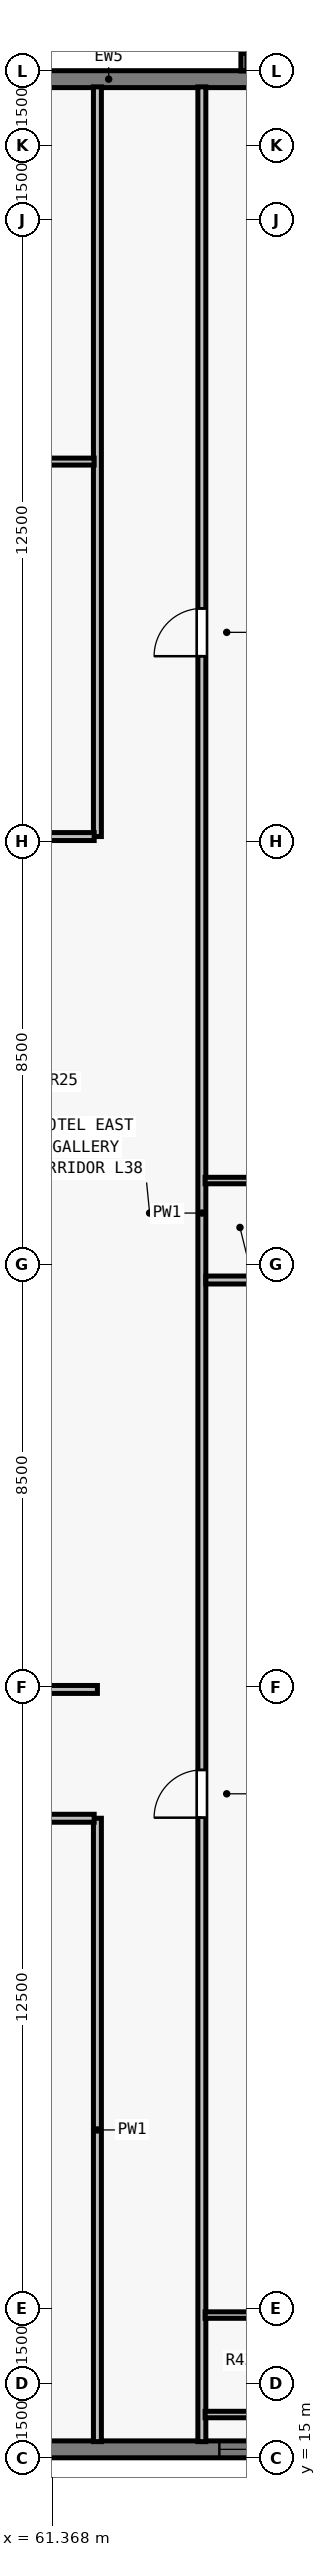
"""IFC4 building model, lengths in metres.
Left out: names, types, materials, properties, quantities, classifications, styles, units other than length and angle.
Written with IfcOpenShell. Run it as: python <this file> out.ifc"""

import sys

from ifc_helpers import new_model, si_unit, direction, frame, frame_2d, origin, place, context, subcontext, project, spatial, rectangle, extrude, element, fill, save


model = new_model("IFC4")
c1 = context("Model", 3, precision=1e-05, world=origin(), true_north=direction((0.0, 1.0)))
c2 = subcontext(c1, "Body", "Model", "MODEL_VIEW")
j1 = project(units=[si_unit("LENGTHUNIT", "METRE"), si_unit("PLANEANGLEUNIT", "RADIAN")], contexts=[c1])
p1 = place(None, origin())
s1 = spatial("IfcSite", under=j1, at=p1, CompositionType="ELEMENT")
p2 = place(p1, origin())
s2 = spatial("IfcBuilding", under=s1, at=p2, CompositionType="ELEMENT")
p3 = place(p2, frame((0.0, 0.0, 141.0)))
s3 = spatial("IfcBuildingStorey", under=s2, at=p3, CompositionType="ELEMENT", Elevation=141.0)
p4 = place(p3, frame((32.0, 62.83, 0.0), z_axis=(0.0, 0.0, 1.0), x_axis=(1.0, 0.0, 0.0)))
e1 = element("IfcWall", 1, at=p4, inside=s3, PredefinedType="SOLIDWALL", context=c2, shape_type="SweptSolid", body=[
    extrude(rectangle(XDim=39.682, YDim=0.34, at=frame_2d((19.841, 0.0))), origin(), (0.0, 0.0, 1.0), 3.28),
])
p5 = place(p4, frame((4.102, 0.0, 0.8)))
e2 = element("IfcOpeningElement", 2, at=p5, cuts=e1, PredefinedType="OPENING", context=c2, shape_type="SweptSolid", body=[
    extrude(rectangle(XDim=1.35, YDim=1.66, at=frame_2d((0.675, 0.83))), frame((0.0, 0.18, 0.0), z_axis=(0.0, -1.0, 0.0), x_axis=(1.0, 0.0, 0.0)), (0.0, 0.0, 1.0), 0.36),
])
p6 = place(p4, frame((8.755, 0.0, 0.8)))
e3 = element("IfcOpeningElement", 3, at=p6, cuts=e1, PredefinedType="OPENING", context=c2, shape_type="SweptSolid", body=[
    extrude(rectangle(XDim=1.75, YDim=1.66, at=frame_2d((0.875, 0.83))), frame((0.0, 0.18, 0.0), z_axis=(0.0, -1.0, 0.0), x_axis=(1.0, 0.0, 0.0)), (0.0, 0.0, 1.0), 0.36),
])
p7 = place(p4, frame((12.059, 0.0, 0.8)))
e4 = element("IfcOpeningElement", 4, at=p7, cuts=e1, PredefinedType="OPENING", context=c2, shape_type="SweptSolid", body=[
    extrude(rectangle(XDim=1.35, YDim=1.66, at=frame_2d((0.675, 0.83))), frame((0.0, 0.18, 0.0), z_axis=(0.0, -1.0, 0.0), x_axis=(1.0, 0.0, 0.0)), (0.0, 0.0, 1.0), 0.36),
])
p8 = place(p4, frame((16.262, 0.0, 0.8)))
e5 = element("IfcOpeningElement", 5, at=p8, cuts=e1, PredefinedType="OPENING", context=c2, shape_type="SweptSolid", body=[
    extrude(rectangle(XDim=1.75, YDim=1.66, at=frame_2d((0.875, 0.83))), frame((0.0, 0.18, 0.0), z_axis=(0.0, -1.0, 0.0), x_axis=(1.0, 0.0, 0.0)), (0.0, 0.0, 1.0), 0.36),
])
p9 = place(p4, frame((18.316, 0.0, 0.8)))
e6 = element("IfcOpeningElement", 6, at=p9, cuts=e1, PredefinedType="OPENING", context=c2, shape_type="SweptSolid", body=[
    extrude(rectangle(XDim=1.35, YDim=1.66, at=frame_2d((0.675, 0.83))), frame((0.0, 0.18, 0.0), z_axis=(0.0, -1.0, 0.0), x_axis=(1.0, 0.0, 0.0)), (0.0, 0.0, 1.0), 0.36),
])
p10 = place(p4, frame((22.07, 0.0, 0.8)))
e7 = element("IfcOpeningElement", 7, at=p10, cuts=e1, PredefinedType="OPENING", context=c2, shape_type="SweptSolid", body=[
    extrude(rectangle(XDim=1.75, YDim=1.66, at=frame_2d((0.875, 0.83))), frame((0.0, 0.18, 0.0), z_axis=(0.0, -1.0, 0.0), x_axis=(1.0, 0.0, 0.0)), (0.0, 0.0, 1.0), 0.36),
])
p11 = place(p4, frame((26.273, 0.0, 0.8)))
e8 = element("IfcOpeningElement", 8, at=p11, cuts=e1, PredefinedType="OPENING", context=c2, shape_type="SweptSolid", body=[
    extrude(rectangle(XDim=1.35, YDim=1.66, at=frame_2d((0.675, 0.83))), frame((0.0, 0.18, 0.0), z_axis=(0.0, -1.0, 0.0), x_axis=(1.0, 0.0, 0.0)), (0.0, 0.0, 1.0), 0.36),
])
p12 = place(p4, frame((33.38, 0.0, 0.8)))
e9 = element("IfcOpeningElement", 9, at=p12, cuts=e1, PredefinedType="OPENING", context=c2, shape_type="SweptSolid", body=[
    extrude(rectangle(XDim=1.35, YDim=1.66, at=frame_2d((0.675, 0.83))), frame((0.0, 0.18, 0.0), z_axis=(0.0, -1.0, 0.0), x_axis=(1.0, 0.0, 0.0)), (0.0, 0.0, 1.0), 0.36),
])
p13 = place(p3, frame((72.0, 15.17, 0.0), z_axis=(0.0, 0.0, 1.0), x_axis=(-1.0, 0.0, 0.0)))
e10 = element("IfcWall", 10, at=p13, inside=s3, PredefinedType="SOLIDWALL", context=c2, shape_type="SweptSolid", body=[
    extrude(rectangle(XDim=26.682, YDim=0.34, at=frame_2d((13.341, 0.0))), origin(), (0.0, 0.0, 1.0), 3.28),
])
p14 = place(p13, frame((5.923, 0.0, 0.8)))
e11 = element("IfcOpeningElement", 11, at=p14, cuts=e10, PredefinedType="OPENING", context=c2, shape_type="SweptSolid", body=[
    extrude(rectangle(XDim=1.35, YDim=1.66, at=frame_2d((0.675, 0.83))), frame((0.0, 0.18, 0.0), z_axis=(0.0, -1.0, 0.0), x_axis=(1.0, 0.0, 0.0)), (0.0, 0.0, 1.0), 0.36),
])
p15 = place(p13, frame((12.666, 0.0, 0.8)))
e12 = element("IfcOpeningElement", 12, at=p15, cuts=e10, PredefinedType="OPENING", context=c2, shape_type="SweptSolid", body=[
    extrude(rectangle(XDim=1.35, YDim=1.66, at=frame_2d((0.675, 0.83))), frame((0.0, 0.18, 0.0), z_axis=(0.0, -1.0, 0.0), x_axis=(1.0, 0.0, 0.0)), (0.0, 0.0, 1.0), 0.36),
])
p16 = place(p13, frame((16.262, 0.0, 0.8)))
e13 = element("IfcOpeningElement", 13, at=p16, cuts=e10, PredefinedType="OPENING", context=c2, shape_type="SweptSolid", body=[
    extrude(rectangle(XDim=1.75, YDim=1.66, at=frame_2d((0.875, 0.83))), frame((0.0, 0.18, 0.0), z_axis=(0.0, -1.0, 0.0), x_axis=(1.0, 0.0, 0.0)), (0.0, 0.0, 1.0), 0.36),
])
p17 = place(p13, frame((19.409, 0.0, 0.8)))
e14 = element("IfcOpeningElement", 14, at=p17, cuts=e10, PredefinedType="OPENING", context=c2, shape_type="SweptSolid", body=[
    extrude(rectangle(XDim=1.35, YDim=1.66, at=frame_2d((0.675, 0.83))), frame((0.0, 0.18, 0.0), z_axis=(0.0, -1.0, 0.0), x_axis=(1.0, 0.0, 0.0)), (0.0, 0.0, 1.0), 0.36),
])
p18 = place(p13, frame((21.59, 0.0, 0.8)))
e15 = element("IfcOpeningElement", 15, at=p18, cuts=e10, PredefinedType="OPENING", context=c2, shape_type="SweptSolid", body=[
    extrude(rectangle(XDim=0.9, YDim=1.66, at=frame_2d((0.45, 0.83))), frame((0.0, 0.18, 0.0), z_axis=(0.0, -1.0, 0.0), x_axis=(1.0, 0.0, 0.0)), (0.0, 0.0, 1.0), 0.36),
])
p19 = place(p3, frame((64.375, 15.325, 0.0), z_axis=(0.0, 0.0, 1.0), x_axis=(0.0, 1.0, 0.0)))
e16 = element("IfcWall", 16, at=p19, inside=s3, PredefinedType="PARTITIONING", context=c2, shape_type="SweptSolid", body=[
    extrude(rectangle(XDim=47.35, YDim=0.16, at=frame_2d((23.675, 0.0))), origin(), (0.0, 0.0, 1.0), 2.555),
])
p20 = place(p19, frame((12.547, 0.0, 0.0)))
e17 = element("IfcOpeningElement", 17, at=p20, cuts=e16, PredefinedType="OPENING", context=c2, shape_type="SweptSolid", body=[
    extrude(rectangle(XDim=0.96, YDim=2.15, at=frame_2d((0.48, 1.075))), frame((0.0, 0.09, 0.0), z_axis=(0.0, -1.0, 0.0), x_axis=(1.0, 0.0, 0.0)), (0.0, 0.0, 1.0), 0.18),
])
p21 = place(p19, frame((35.902, 0.0, 0.0)))
e18 = element("IfcOpeningElement", 18, at=p21, cuts=e16, PredefinedType="OPENING", context=c2, shape_type="SweptSolid", body=[
    extrude(rectangle(XDim=0.96, YDim=2.15, at=frame_2d((0.48, 1.075))), frame((0.0, 0.09, 0.0), z_axis=(0.0, -1.0, 0.0), x_axis=(1.0, 0.0, 0.0)), (0.0, 0.0, 1.0), 0.18),
])
p22 = place(p3, frame((62.275, 15.325, 0.0), z_axis=(0.0, 0.0, 1.0), x_axis=(0.0, 1.0, 0.0)))
e19 = element("IfcWall", 19, at=p22, inside=s3, PredefinedType="PARTITIONING", context=c2, shape_type="SweptSolid", body=[
    extrude(rectangle(XDim=12.535, YDim=0.16, at=frame_2d((6.268, 0.0))), origin(), (0.0, 0.0, 1.0), 3.28),
])
p23 = place(p3, frame((62.275, 47.6, 0.0), z_axis=(0.0, 0.0, 1.0), x_axis=(0.0, 1.0, 0.0)))
e20 = element("IfcWall", 20, at=p23, inside=s3, PredefinedType="PARTITIONING", context=c2, shape_type="SweptSolid", body=[
    extrude(rectangle(XDim=15.075, YDim=0.16, at=frame_2d((7.538, 0.0))), origin(), (0.0, 0.0, 1.0), 2.555),
])
p24 = place(p3, frame((60.765, 30.45, 0.0), z_axis=(0.0, 0.0, 1.0), x_axis=(1.0, 0.0, 0.0)))
e21 = element("IfcWall", 21, at=p24, inside=s3, PredefinedType="PARTITIONING", context=c2, shape_type="SweptSolid", body=[
    extrude(rectangle(XDim=1.51, YDim=0.16, at=frame_2d((0.755, 0.0))), origin(), (0.0, 0.0, 1.0), 3.28),
])
p25 = place(p3, frame((60.765, 47.6, 0.0), z_axis=(0.0, 0.0, 1.0), x_axis=(1.0, 0.0, 0.0)))
e22 = element("IfcWall", 22, at=p25, inside=s3, PredefinedType="PARTITIONING", context=c2, shape_type="SweptSolid", body=[
    extrude(rectangle(XDim=1.445, YDim=0.16, at=frame_2d((0.723, 0.0))), origin(), (0.0, 0.0, 1.0), 3.28),
])
p26 = place(p3, frame((40.14, 27.86, 0.0), z_axis=(0.0, 0.0, 1.0), x_axis=(1.0, 0.0, 0.0)))
e23 = element("IfcWall", 23, at=p26, inside=s3, PredefinedType="PARTITIONING", context=c2, shape_type="SweptSolid", body=[
    extrude(rectangle(XDim=22.07, YDim=0.16, at=frame_2d((11.035, 0.0))), origin(), (0.0, 0.0, 1.0), 3.28),
])
p27 = place(p26, frame((3.834, 0.0, 0.0)))
e24 = element("IfcOpeningElement", 24, at=p27, cuts=e23, PredefinedType="OPENING", context=c2, shape_type="SweptSolid", body=[
    extrude(rectangle(XDim=0.96, YDim=2.15, at=frame_2d((0.48, 1.075))), frame((0.0, 0.09, 0.0), z_axis=(0.0, -1.0, 0.0), x_axis=(1.0, 0.0, 0.0)), (0.0, 0.0, 1.0), 0.18),
])
p28 = place(p26, frame((8.746, 0.0, 0.0)))
e25 = element("IfcOpeningElement", 25, at=p28, cuts=e23, PredefinedType="OPENING", context=c2, shape_type="SweptSolid", body=[
    extrude(rectangle(XDim=0.96, YDim=2.15, at=frame_2d((0.48, 1.075))), frame((0.0, 0.09, 0.0), z_axis=(0.0, -1.0, 0.0), x_axis=(1.0, 0.0, 0.0)), (0.0, 0.0, 1.0), 0.18),
])
p29 = place(p26, frame((14.46, 0.0, 0.0)))
e26 = element("IfcOpeningElement", 26, at=p29, cuts=e23, PredefinedType="OPENING", context=c2, shape_type="SweptSolid", body=[
    extrude(rectangle(XDim=0.96, YDim=2.15, at=frame_2d((0.48, 1.075))), frame((0.0, 0.09, 0.0), z_axis=(0.0, -1.0, 0.0), x_axis=(1.0, 0.0, 0.0)), (0.0, 0.0, 1.0), 0.18),
])
p30 = place(p26, frame((19.993, 0.0, 0.0)))
e27 = element("IfcOpeningElement", 27, at=p30, cuts=e23, PredefinedType="OPENING", context=c2, shape_type="SweptSolid", body=[
    extrude(rectangle(XDim=0.96, YDim=2.15, at=frame_2d((0.48, 1.075))), frame((0.0, 0.09, 0.0), z_axis=(0.0, -1.0, 0.0), x_axis=(1.0, 0.0, 0.0)), (0.0, 0.0, 1.0), 0.18),
])
p31 = place(p3, frame((40.14, 55.14, 0.0), z_axis=(0.0, 0.0, 1.0), x_axis=(1.0, 0.0, 0.0)))
e28 = element("IfcWall", 28, at=p31, inside=s3, PredefinedType="PARTITIONING", context=c2, shape_type="SweptSolid", body=[
    extrude(rectangle(XDim=22.07, YDim=0.14, at=frame_2d((11.035, 0.0))), origin(), (0.0, 0.0, 1.0), 3.28),
])
p32 = place(p31, frame((3.435, 0.0, 0.0)))
e29 = element("IfcOpeningElement", 29, at=p32, cuts=e28, PredefinedType="OPENING", context=c2, shape_type="SweptSolid", body=[
    extrude(rectangle(XDim=0.92, YDim=2.12, at=frame_2d((0.46, 1.06))), frame((0.0, 0.08, 0.0), z_axis=(0.0, -1.0, 0.0), x_axis=(1.0, 0.0, 0.0)), (0.0, 0.0, 1.0), 0.16),
])
p33 = place(p31, frame((14.435, 0.0, 0.0)))
e30 = element("IfcOpeningElement", 30, at=p33, cuts=e28, PredefinedType="OPENING", context=c2, shape_type="SweptSolid", body=[
    extrude(rectangle(XDim=0.92, YDim=2.12, at=frame_2d((0.46, 1.06))), frame((0.0, 0.08, 0.0), z_axis=(0.0, -1.0, 0.0), x_axis=(1.0, 0.0, 0.0)), (0.0, 0.0, 1.0), 0.16),
])
for number, where, z_axis, x_axis in (
    (31, (64.44, 15.87, 0.0), (0.0, 0.0, 1.0), (1.0, 0.0, 0.0)),
    (32, (64.44, 17.87, 0.0), (0.0, 0.0, 1.0), (1.0, 0.0, 0.0)),
):
    element("IfcWall", number, at=place(p3, frame(where, z_axis=z_axis, x_axis=x_axis)), inside=s3, PredefinedType="PLUMBINGWALL", context=c2, shape_type="SweptSolid", body=[
        extrude(rectangle(XDim=2.315, YDim=0.13, at=frame_2d((1.157, 0.0))), origin(), (0.0, 0.0, 1.0), 3.28),
    ])
p34 = place(p3, frame((64.455, 38.683, 0.0), z_axis=(0.0, 0.0, 1.0), x_axis=(1.0, 0.0, 0.0)))
e33 = element("IfcWall", 33, at=p34, inside=s3, PredefinedType="PARTITIONING", context=c2, shape_type="SweptSolid", body=[
    extrude(rectangle(XDim=11.22, YDim=0.16, at=frame_2d((5.61, 0.0))), origin(), (0.0, 0.0, 1.0), 3.28),
])
p35 = place(p3, frame((64.44, 40.683, 0.0), z_axis=(0.0, 0.0, 1.0), x_axis=(1.0, 0.0, 0.0)))
e34 = element("IfcWall", 34, at=p35, inside=s3, PredefinedType="PLUMBINGWALL", context=c2, shape_type="SweptSolid", body=[
    extrude(rectangle(XDim=2.315, YDim=0.13, at=frame_2d((1.157, 0.0))), origin(), (0.0, 0.0, 1.0), 3.28),
])
p36 = place(p14, origin())
e35 = element("IfcWindow", 35, at=p36, inside=s3, PartitioningType="SINGLE_PANEL", PredefinedType="WINDOW", context=c2, shape_type="SweptSolid", body=[
    extrude(rectangle(XDim=1.35, YDim=1.66, at=frame_2d((0.675, 0.83))), frame((0.0, -0.05, 0.0), z_axis=(0.0, -1.0, 0.0), x_axis=(1.0, 0.0, 0.0)), (0.0, 0.0, 1.0), 0.06),
])
fill(e11, e35)
p37 = place(p20, origin())
e36 = element("IfcDoor", 36, at=p37, inside=s3, OperationType="SINGLE_SWING_LEFT", PredefinedType="DOOR", context=c2, shape_type="SweptSolid", body=[
    extrude(rectangle(XDim=0.96, YDim=2.15, at=frame_2d((0.48, 1.075))), frame((0.0, 0.025, 0.0), z_axis=(0.0, -1.0, 0.0), x_axis=(1.0, 0.0, 0.0)), (0.0, 0.0, 1.0), 0.05),
])
fill(e17, e36)
p38 = place(p21, origin())
e37 = element("IfcDoor", 37, at=p38, inside=s3, OperationType="SINGLE_SWING_LEFT", PredefinedType="DOOR", context=c2, shape_type="SweptSolid", body=[
    extrude(rectangle(XDim=0.96, YDim=2.15, at=frame_2d((0.48, 1.075))), frame((0.0, 0.025, 0.0), z_axis=(0.0, -1.0, 0.0), x_axis=(1.0, 0.0, 0.0)), (0.0, 0.0, 1.0), 0.05),
])
fill(e18, e37)
save(model, sys.argv[1])
